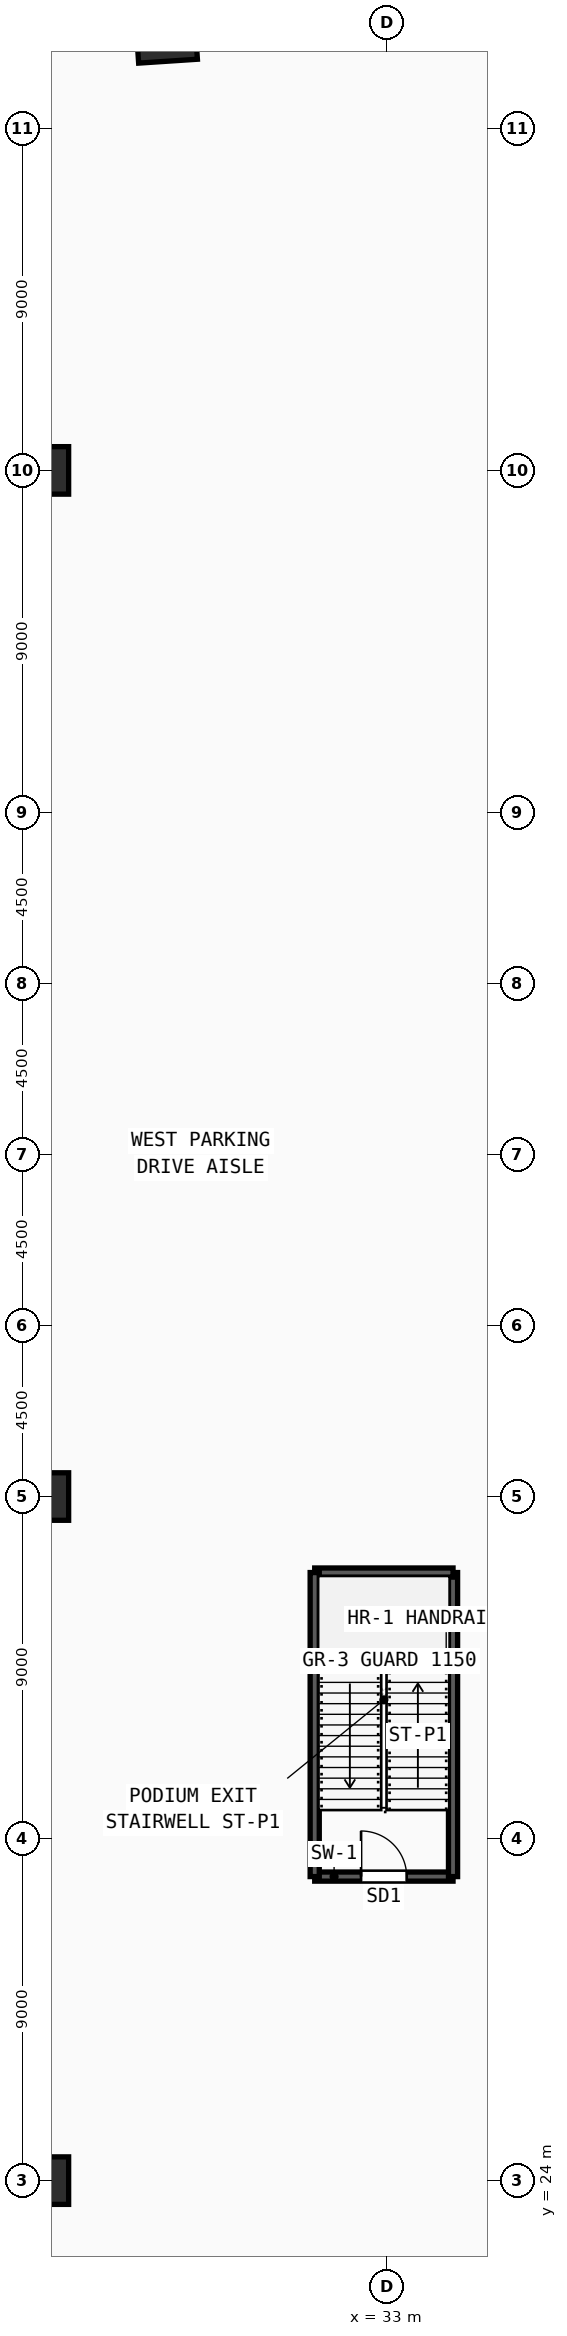
"""IFC4 building model, lengths in metres.
Left out: names, types, materials, properties, quantities, classifications, styles, units other than length and angle.
Written with IfcOpenShell. Run it as: python <this file> out.ifc"""

import sys

from ifc_helpers import new_model, si_unit, direction, frame, frame_2d, origin, origin_2d, place, context, subcontext, project, spatial, rectangle, extrude, source, transform, mapped, element, fill, save


model = new_model("IFC4")
c1 = context("Model", 3, precision=1e-05, world=origin(), true_north=direction((0.0, 1.0)))
c2 = subcontext(c1, "Body", "Model", "MODEL_VIEW")
j1 = project(units=[si_unit("LENGTHUNIT", "METRE"), si_unit("PLANEANGLEUNIT", "RADIAN")], contexts=[c1])
p1 = place(None, origin())
s1 = spatial("IfcSite", under=j1, at=p1, CompositionType="ELEMENT")
p2 = place(p1, origin())
s2 = spatial("IfcBuilding", under=s1, at=p2, CompositionType="ELEMENT")
p3 = place(p2, frame((0.0, 0.0, -4.8)))
s3 = spatial("IfcBuildingStorey", under=s2, at=p3, CompositionType="ELEMENT", Elevation=-4.8)
m1 = source(origin(), c2, "Body", "SweptSolid", [
    extrude(rectangle(XDim=1.55, YDim=1.25, at=origin_2d()), origin(), (0.0, 0.0, 1.0), 4.8),
])
p4 = place(p3, frame((27.199, 80.391, 0.0), z_axis=(0.0, 0.0, 1.0), x_axis=(0.997824541457, 0.065925597951, 0.0)))
e1 = element("IfcColumn", 1, at=p4, inside=s3, PredefinedType="COLUMN", context=c2, shape_type="MappedRepresentation", body=[
    mapped(m1, transform((0.0, 0.0, 0.0), x_axis=(1.0, 0.0, 0.0), y_axis=(0.0, 1.0, 0.0), z_axis=(0.0, 0.0, 1.0), scale=1.0)),
])
m2 = source(origin(), c2, "Body", "SweptSolid", [
    extrude(rectangle(XDim=1.25, YDim=1.25, at=origin_2d()), origin(), (0.0, 0.0, 1.0), 4.8),
])
for number, where, z_axis, x_axis in (
    (2, (24.0, 24.0, 0.0), (0.0, 0.0, 1.0), (1.0, 0.0, 0.0)),
    (3, (24.0, 42.0, 0.0), (0.0, 0.0, 1.0), (1.0, 0.0, 0.0)),
    (4, (24.0, 69.0, 0.0), (0.0, 0.0, 1.0), (1.0, 0.0, 0.0)),
):
    element("IfcColumn", number, at=place(p3, frame(where, z_axis=z_axis, x_axis=x_axis)), inside=s3, PredefinedType="COLUMN", context=c2, shape_type="MappedRepresentation", body=[
        mapped(m2, transform((0.0, 0.0, 0.0), x_axis=(1.0, 0.0, 0.0), y_axis=(0.0, 1.0, 0.0), z_axis=(0.0, 0.0, 1.0), scale=1.0)),
    ])
p5 = place(p3, frame((31.1, 32.0, 0.0), z_axis=(0.0, 0.0, 1.0), x_axis=(1.0, 0.0, 0.0)))
e5 = element("IfcWall", 5, at=p5, inside=s3, PredefinedType="SOLIDWALL", context=c2, shape_type="SweptSolid", body=[
    extrude(rectangle(XDim=3.64, YDim=0.24, at=frame_2d((1.82, 0.0))), origin(), (0.0, 0.0, 1.0), 4.55),
])
m3 = source(origin(), c2, "Body", "SweptSolid", [
    extrude(rectangle(XDim=1.2, YDim=2.2, at=frame_2d((0.6, 1.1))), frame((0.0, 0.13, 0.0), z_axis=(0.0, -1.0, 0.0), x_axis=(1.0, 0.0, 0.0)), (0.0, 0.0, 1.0), 0.26),
])
p6 = place(p5, frame((1.22, 0.0, 0.0)))
e6 = element("IfcOpeningElement", 6, at=p6, cuts=e5, PredefinedType="OPENING", context=c2, shape_type="MappedRepresentation", body=[
    mapped(m3, transform((0.0, 0.0, 0.0), x_axis=(1.0, 0.0, 0.0), y_axis=(0.0, 1.0, 0.0), z_axis=(0.0, 0.0, 1.0), scale=1.0)),
])
p7 = place(p3, frame((34.74, 32.0, 0.0), z_axis=(0.0, 0.0, 1.0), x_axis=(0.0, 1.0, 0.0)))
e7 = element("IfcWall", 7, at=p7, inside=s3, PredefinedType="SOLIDWALL", context=c2, shape_type="SweptSolid", body=[
    extrude(rectangle(XDim=8.0, YDim=0.24, at=frame_2d((4.0, 0.0))), origin(), (0.0, 0.0, 1.0), 4.55),
])
p8 = place(p3, frame((34.74, 40.0, 0.0), z_axis=(0.0, 0.0, 1.0), x_axis=(-1.0, 0.0, 0.0)))
e8 = element("IfcWall", 8, at=p8, inside=s3, PredefinedType="SOLIDWALL", context=c2, shape_type="SweptSolid", body=[
    extrude(rectangle(XDim=3.64, YDim=0.24, at=frame_2d((1.82, 0.0))), origin(), (0.0, 0.0, 1.0), 4.55),
])
p9 = place(p3, frame((31.1, 40.0, 0.0), z_axis=(0.0, 0.0, 1.0), x_axis=(0.0, -1.0, 0.0)))
e9 = element("IfcWall", 9, at=p9, inside=s3, PredefinedType="SOLIDWALL", context=c2, shape_type="SweptSolid", body=[
    extrude(rectangle(XDim=8.0, YDim=0.24, at=frame_2d((4.0, 0.0))), origin(), (0.0, 0.0, 1.0), 4.55),
])
m4 = source(origin(), c2, "Body", "SweptSolid", [
    extrude(rectangle(XDim=1.2, YDim=2.2, at=frame_2d((0.6, 1.1))), frame((0.0, 0.025, 0.0), z_axis=(0.0, -1.0, 0.0), x_axis=(1.0, 0.0, 0.0)), (0.0, 0.0, 1.0), 0.05),
])
p10 = place(p6, origin())
e10 = element("IfcDoor", 10, at=p10, inside=s3, OperationType="SINGLE_SWING_LEFT", PredefinedType="DOOR", context=c2, shape_type="MappedRepresentation", body=[
    mapped(m4, transform((0.0, 0.0, 0.0), x_axis=(1.0, 0.0, 0.0), y_axis=(0.0, 1.0, 0.0), z_axis=(0.0, 0.0, 1.0), scale=1.0)),
])
fill(e6, e10)
save(model, sys.argv[1])
